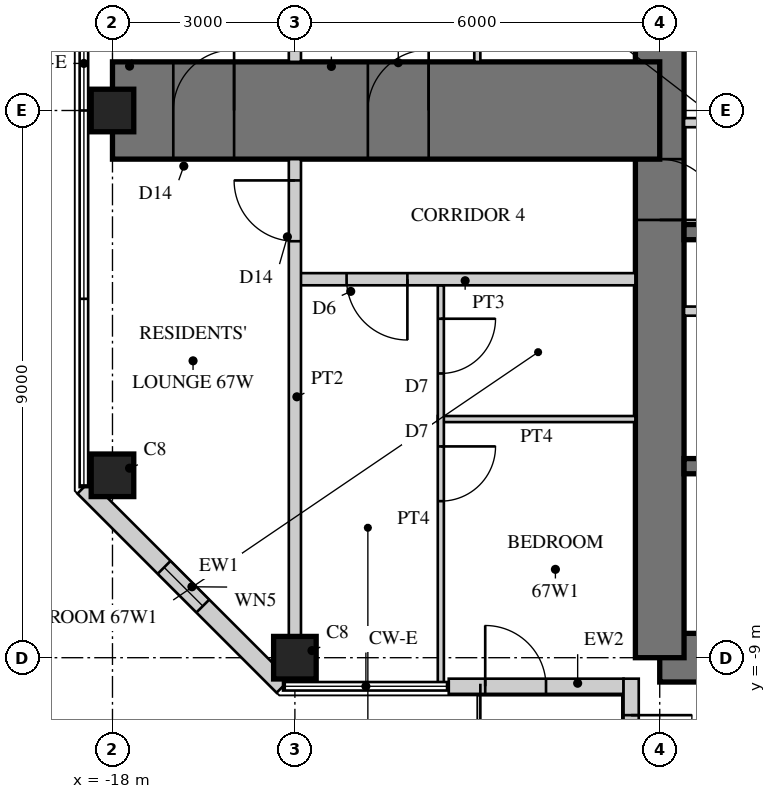
"""IFC4 building model, lengths in metres.
Left out: names, types, materials, properties, quantities, classifications, styles, units other than length and angle.
Written with IfcOpenShell. Run it as: python <this file> out.ifc"""

import sys

from ifc_helpers import new_model, si_unit, direction, frame, frame_2d, origin, origin_2d, place, context, subcontext, project, spatial, rectangle, hollow_rectangle, extrude, element, fill, save


model = new_model("IFC4")
c1 = context("Model", 3, precision=1e-05, world=origin(), true_north=direction((0.0, 1.0)))
c2 = subcontext(c1, "Body", "Model", "MODEL_VIEW")
j1 = project(units=[si_unit("LENGTHUNIT", "METRE"), si_unit("PLANEANGLEUNIT", "RADIAN")], contexts=[c1])
p1 = place(None, origin())
s1 = spatial("IfcSite", under=j1, at=p1, CompositionType="ELEMENT")
p2 = place(p1, origin())
s2 = spatial("IfcBuilding", under=s1, at=p2, CompositionType="ELEMENT")
p3 = place(p2, frame((0.0, 0.0, 261.1)))
s3 = spatial("IfcBuildingStorey", under=s2, at=p3, CompositionType="ELEMENT", Elevation=261.1)
p4 = place(p3, frame((-9.0, -9.0, 0.0), z_axis=(0.0, 0.0, 1.0), x_axis=(1.0, 0.0, 0.0)))
e1 = element("IfcWall", 1, at=p4, inside=s3, PredefinedType="SHEAR", context=c2, shape_type="SweptSolid", body=[
    extrude(rectangle(XDim=18.0, YDim=0.8, at=frame_2d((9.0, 0.0))), origin(), (0.0, 0.0, 1.0), 3.4),
])
p5 = place(p4, frame((9.8, 0.0, 0.0)))
e2 = element("IfcOpeningElement", 2, at=p5, cuts=e1, PredefinedType="OPENING", context=c2, shape_type="SweptSolid", body=[
    extrude(rectangle(XDim=1.0, YDim=2.4, at=frame_2d((0.5, 1.2))), frame((0.0, 0.41, 0.0), z_axis=(0.0, -1.0, 0.0), x_axis=(1.0, 0.0, 0.0)), (0.0, 0.0, 1.0), 0.82),
])
p6 = place(p3, frame((-9.0, 9.0, 0.0), z_axis=(0.0, 0.0, 1.0), x_axis=(0.0, -1.0, 0.0)))
e3 = element("IfcWall", 3, at=p6, inside=s3, PredefinedType="SHEAR", context=c2, shape_type="SweptSolid", body=[
    extrude(rectangle(XDim=18.0, YDim=0.8, at=frame_2d((9.0, 0.0))), origin(), (0.0, 0.0, 1.0), 3.4),
])
p7 = place(p6, frame((9.8, 0.0, 0.0)))
e4 = element("IfcOpeningElement", 4, at=p7, cuts=e3, PredefinedType="OPENING", context=c2, shape_type="SweptSolid", body=[
    extrude(rectangle(XDim=1.0, YDim=2.4, at=frame_2d((0.5, 1.2))), frame((0.0, 0.41, 0.0), z_axis=(0.0, -1.0, 0.0), x_axis=(1.0, 0.0, 0.0)), (0.0, 0.0, 1.0), 0.82),
])
p8 = place(p3, frame((-1.925, -2.0, 0.0), z_axis=(0.0, 0.0, 1.0), x_axis=(-1.0, 0.0, 0.0)))
e5 = element("IfcWall", 5, at=p8, inside=s3, PredefinedType="SHEAR", context=c2, shape_type="SweptSolid", body=[
    extrude(rectangle(XDim=6.675, YDim=0.25, at=frame_2d((3.337, 0.0))), origin(), (0.0, 0.0, 1.0), 3.4),
])
p9 = place(p3, frame((-1.925, -5.85, 0.0), z_axis=(0.0, 0.0, 1.0), x_axis=(-1.0, 0.0, 0.0)))
e6 = element("IfcWall", 6, at=p9, inside=s3, PredefinedType="SHEAR", context=c2, shape_type="SweptSolid", body=[
    extrude(rectangle(XDim=6.675, YDim=0.25, at=frame_2d((3.337, 0.0))), origin(), (0.0, 0.0, 1.0), 3.4),
])
p10 = place(p9, frame((0.496, 0.0, 0.0)))
e7 = element("IfcOpeningElement", 7, at=p10, cuts=e6, PredefinedType="OPENING", context=c2, shape_type="SweptSolid", body=[
    extrude(rectangle(XDim=1.1, YDim=2.2, at=frame_2d((0.55, 1.1))), frame((0.0, 0.135, 0.0), z_axis=(0.0, -1.0, 0.0), x_axis=(1.0, 0.0, 0.0)), (0.0, 0.0, 1.0), 0.27),
])
p11 = place(p9, frame((2.788, 0.0, 0.0)))
e8 = element("IfcOpeningElement", 8, at=p11, cuts=e6, PredefinedType="OPENING", context=c2, shape_type="SweptSolid", body=[
    extrude(rectangle(XDim=1.1, YDim=2.2, at=frame_2d((0.55, 1.1))), frame((0.0, 0.135, 0.0), z_axis=(0.0, -1.0, 0.0), x_axis=(1.0, 0.0, 0.0)), (0.0, 0.0, 1.0), 0.27),
])
p12 = place(p9, frame((5.079, 0.0, 0.0)))
e9 = element("IfcOpeningElement", 9, at=p12, cuts=e6, PredefinedType="OPENING", context=c2, shape_type="SweptSolid", body=[
    extrude(rectangle(XDim=1.1, YDim=2.2, at=frame_2d((0.55, 1.1))), frame((0.0, 0.135, 0.0), z_axis=(0.0, -1.0, 0.0), x_axis=(1.0, 0.0, 0.0)), (0.0, 0.0, 1.0), 0.27),
])
p13 = place(p3, frame((-1.925, -3.3, 0.0), z_axis=(0.0, 0.0, 1.0), x_axis=(-1.0, 0.0, 0.0)))
e10 = element("IfcWall", 10, at=p13, inside=s3, PredefinedType="PARTITIONING", context=c2, shape_type="SweptSolid", body=[
    extrude(rectangle(XDim=6.675, YDim=0.15, at=frame_2d((3.337, 0.0))), origin(), (0.0, 0.0, 1.0), 3.4),
])
p14 = place(p13, frame((0.075, 0.0, 0.0)))
e11 = element("IfcOpeningElement", 11, at=p14, cuts=e10, PredefinedType="OPENING", context=c2, shape_type="SweptSolid", body=[
    extrude(rectangle(XDim=0.8, YDim=2.1, at=frame_2d((0.4, 1.05))), frame((0.0, 0.085, 0.0), z_axis=(0.0, -1.0, 0.0), x_axis=(1.0, 0.0, 0.0)), (0.0, 0.0, 1.0), 0.17),
])
p15 = place(p13, frame((3.675, 0.0, 0.0)))
e12 = element("IfcOpeningElement", 12, at=p15, cuts=e10, PredefinedType="OPENING", context=c2, shape_type="SweptSolid", body=[
    extrude(rectangle(XDim=0.8, YDim=2.1, at=frame_2d((0.4, 1.05))), frame((0.0, 0.085, 0.0), z_axis=(0.0, -1.0, 0.0), x_axis=(1.0, 0.0, 0.0)), (0.0, 0.0, 1.0), 0.17),
])
p16 = place(p3, frame((-9.0, 0.0, 0.0), z_axis=(0.0, 0.0, 1.0), x_axis=(-1.0, 0.0, 0.0)))
e13 = element("IfcWall", 13, at=p16, inside=s3, PredefinedType="SHEAR", context=c2, shape_type="SweptSolid", body=[
    extrude(rectangle(XDim=9.0, YDim=1.6, at=frame_2d((4.5, 0.0))), origin(), (0.0, 0.0, 1.0), 3.4),
])
p17 = place(p16, frame((3.8, 0.0, 0.0)))
e14 = element("IfcOpeningElement", 14, at=p17, cuts=e13, PredefinedType="OPENING", context=c2, shape_type="SweptSolid", body=[
    extrude(rectangle(XDim=1.0, YDim=2.15, at=frame_2d((0.5, 1.075))), frame((0.0, 0.81, 0.0), z_axis=(0.0, -1.0, 0.0), x_axis=(1.0, 0.0, 0.0)), (0.0, 0.0, 1.0), 1.62),
])
p18 = place(p16, frame((7.0, 0.0, 0.0)))
e15 = element("IfcOpeningElement", 15, at=p18, cuts=e13, PredefinedType="OPENING", context=c2, shape_type="SweptSolid", body=[
    extrude(rectangle(XDim=1.0, YDim=2.2, at=frame_2d((0.5, 1.1))), frame((0.0, 0.81, 0.0), z_axis=(0.0, -1.0, 0.0), x_axis=(1.0, 0.0, 0.0)), (0.0, 0.0, 1.0), 1.62),
])
for number, where, z_axis, x_axis in (
    (16, (-15.0, -9.0, 0.0), (0.0, 0.0, 1.0), (1.0, 0.0, 0.0)),
    (17, (-18.0, 0.0, 0.0), (0.0, 0.0, 1.0), (1.0, 0.0, 0.0)),
    (18, (-18.0, -6.0, 0.0), (0.0, 0.0, 1.0), (1.0, 0.0, 0.0)),
):
    element("IfcColumn", number, at=place(p3, frame(where, z_axis=z_axis, x_axis=x_axis)), inside=s3, PredefinedType="COLUMN", context=c2, shape_type="SweptSolid", body=[
        extrude(rectangle(XDim=0.7, YDim=0.7, at=origin_2d()), origin(), (0.0, 0.0, 1.0), 3.4),
    ])
p19 = place(p3, frame((-18.47, -6.195, 0.0), z_axis=(0.0, 0.0, 1.0), x_axis=(0.707106781187, -0.707106781187, 0.0)))
e19 = element("IfcWall", 19, at=p19, inside=s3, PredefinedType="SOLIDWALL", context=c2, shape_type="SweptSolid", body=[
    extrude(rectangle(XDim=4.632, YDim=0.3, at=frame_2d((2.316, 0.0))), origin(), (0.0, 0.0, 1.0), 3.22),
])
p20 = place(p19, frame((1.866, 0.0, 0.3)))
e20 = element("IfcOpeningElement", 20, at=p20, cuts=e19, PredefinedType="OPENING", context=c2, shape_type="SweptSolid", body=[
    extrude(rectangle(XDim=0.9, YDim=2.4, at=frame_2d((0.45, 1.2))), frame((0.0, 0.16, 0.0), z_axis=(0.0, -1.0, 0.0), x_axis=(1.0, 0.0, 0.0)), (0.0, 0.0, 1.0), 0.32),
])
p21 = place(p3, frame((-12.47, -9.47, 0.0), z_axis=(0.0, 0.0, 1.0), x_axis=(1.0, 0.0, 0.0)))
e21 = element("IfcWall", 21, at=p21, inside=s3, PredefinedType="SOLIDWALL", context=c2, shape_type="SweptSolid", body=[
    extrude(rectangle(XDim=2.875, YDim=0.25, at=frame_2d((1.438, 0.0))), origin(), (0.0, 0.0, 1.0), 3.22),
])
p22 = place(p21, frame((0.6, 0.0, 0.0)))
e22 = element("IfcOpeningElement", 22, at=p22, cuts=e21, PredefinedType="OPENING", context=c2, shape_type="SweptSolid", body=[
    extrude(rectangle(XDim=1.0, YDim=2.2, at=frame_2d((0.5, 1.1))), frame((0.0, 0.135, 0.0), z_axis=(0.0, -1.0, 0.0), x_axis=(1.0, 0.0, 0.0)), (0.0, 0.0, 1.0), 0.27),
])
p23 = place(p3, frame((-9.47, -9.345, 0.0), z_axis=(0.0, 0.0, 1.0), x_axis=(0.0, -1.0, 0.0)))
e23 = element("IfcWall", 23, at=p23, inside=s3, PredefinedType="SOLIDWALL", context=c2, shape_type="SweptSolid", body=[
    extrude(rectangle(XDim=3.125, YDim=0.25, at=frame_2d((1.562, 0.0))), origin(), (0.0, 0.0, 1.0), 3.22),
])
p24 = place(p23, frame((0.6, 0.0, 0.0)))
e24 = element("IfcOpeningElement", 24, at=p24, cuts=e23, PredefinedType="OPENING", context=c2, shape_type="SweptSolid", body=[
    extrude(rectangle(XDim=1.0, YDim=2.2, at=frame_2d((0.5, 1.1))), frame((0.0, 0.135, 0.0), z_axis=(0.0, -1.0, 0.0), x_axis=(1.0, 0.0, 0.0)), (0.0, 0.0, 1.0), 0.27),
])
p25 = place(p3, frame((-2.325, -0.2, 0.0), z_axis=(0.0, 0.0, 1.0), x_axis=(-1.0, 0.0, 0.0)))
e25 = element("IfcWall", 25, at=p25, inside=s3, PredefinedType="PARTITIONING", context=c2, shape_type="SweptSolid", body=[
    extrude(rectangle(XDim=6.275, YDim=0.15, at=frame_2d((3.138, 0.0))), origin(), (0.0, 0.0, 1.0), 3.22),
])
p26 = place(p25, frame((0.4, 0.0, 0.0)))
e26 = element("IfcOpeningElement", 26, at=p26, cuts=e25, PredefinedType="OPENING", context=c2, shape_type="SweptSolid", body=[
    extrude(rectangle(XDim=1.0, YDim=2.1, at=frame_2d((0.5, 1.05))), frame((0.0, 0.085, 0.0), z_axis=(0.0, -1.0, 0.0), x_axis=(1.0, 0.0, 0.0)), (0.0, 0.0, 1.0), 0.17),
])
p27 = place(p3, frame((-9.4, -5.075, 0.0), z_axis=(0.0, 0.0, 1.0), x_axis=(-1.0, 0.0, 0.0)))
e27 = element("IfcWall", 27, at=p27, inside=s3, PredefinedType="PARTITIONING", context=c2, shape_type="SweptSolid", body=[
    extrude(rectangle(XDim=3.25, YDim=0.1, at=frame_2d((1.625, 0.0))), origin(), (0.0, 0.0, 1.0), 3.22),
])
p28 = place(p3, frame((-12.6, -2.875, 0.0), z_axis=(0.0, 0.0, 1.0), x_axis=(0.0, -1.0, 0.0)))
e28 = element("IfcWall", 28, at=p28, inside=s3, PredefinedType="PARTITIONING", context=c2, shape_type="SweptSolid", body=[
    extrude(rectangle(XDim=6.555, YDim=0.1, at=frame_2d((3.277, 0.0))), origin(), (0.0, 0.0, 1.0), 3.22),
])
p29 = place(p28, frame((0.55, 0.0, 0.0)))
e29 = element("IfcOpeningElement", 29, at=p29, cuts=e28, PredefinedType="OPENING", context=c2, shape_type="SweptSolid", body=[
    extrude(rectangle(XDim=0.9, YDim=2.1, at=frame_2d((0.45, 1.05))), frame((0.0, 0.06, 0.0), z_axis=(0.0, -1.0, 0.0), x_axis=(1.0, 0.0, 0.0)), (0.0, 0.0, 1.0), 0.12),
])
p30 = place(p28, frame((2.65, 0.0, 0.0)))
e30 = element("IfcOpeningElement", 30, at=p30, cuts=e28, PredefinedType="OPENING", context=c2, shape_type="SweptSolid", body=[
    extrude(rectangle(XDim=0.9, YDim=2.1, at=frame_2d((0.45, 1.05))), frame((0.0, 0.06, 0.0), z_axis=(0.0, -1.0, 0.0), x_axis=(1.0, 0.0, 0.0)), (0.0, 0.0, 1.0), 0.12),
])
p31 = place(p3, frame((-12.0, 9.345, 0.0), z_axis=(0.0, 0.0, 1.0), x_axis=(0.0, -1.0, 0.0)))
e31 = element("IfcWall", 31, at=p31, inside=s3, PredefinedType="PARTITIONING", context=c2, shape_type="SweptSolid", body=[
    extrude(rectangle(XDim=8.545, YDim=0.1, at=frame_2d((4.272, 0.0))), origin(), (0.0, 0.0, 1.0), 3.22),
])
p32 = place(p31, frame((4.995, 0.0, 0.0)))
e32 = element("IfcOpeningElement", 32, at=p32, cuts=e31, PredefinedType="OPENING", context=c2, shape_type="SweptSolid", body=[
    extrude(rectangle(XDim=0.9, YDim=2.1, at=frame_2d((0.45, 1.05))), frame((0.0, 0.06, 0.0), z_axis=(0.0, -1.0, 0.0), x_axis=(1.0, 0.0, 0.0)), (0.0, 0.0, 1.0), 0.12),
])
p33 = place(p31, frame((7.095, 0.0, 0.0)))
e33 = element("IfcOpeningElement", 33, at=p33, cuts=e31, PredefinedType="OPENING", context=c2, shape_type="SweptSolid", body=[
    extrude(rectangle(XDim=0.9, YDim=2.1, at=frame_2d((0.45, 1.05))), frame((0.0, 0.06, 0.0), z_axis=(0.0, -1.0, 0.0), x_axis=(1.0, 0.0, 0.0)), (0.0, 0.0, 1.0), 0.12),
])
p34 = place(p3, frame((-9.4, -2.775, 0.0), z_axis=(0.0, 0.0, 1.0), x_axis=(-1.0, 0.0, 0.0)))
e34 = element("IfcWall", 34, at=p34, inside=s3, PredefinedType="SOLIDWALL", context=c2, shape_type="SweptSolid", body=[
    extrude(rectangle(XDim=5.6, YDim=0.2, at=frame_2d((2.8, 0.0))), origin(), (0.0, 0.0, 1.0), 3.22),
])
p35 = place(p34, frame((3.75, 0.0, 0.0)))
e35 = element("IfcOpeningElement", 35, at=p35, cuts=e34, PredefinedType="OPENING", context=c2, shape_type="SweptSolid", body=[
    extrude(rectangle(XDim=1.0, YDim=2.15, at=frame_2d((0.5, 1.075))), frame((0.0, 0.11, 0.0), z_axis=(0.0, -1.0, 0.0), x_axis=(1.0, 0.0, 0.0)), (0.0, 0.0, 1.0), 0.22),
])
p36 = place(p3, frame((-15.0, 8.65, 0.0), z_axis=(0.0, 0.0, 1.0), x_axis=(0.0, -1.0, 0.0)))
e36 = element("IfcWall", 36, at=p36, inside=s3, PredefinedType="SOLIDWALL", context=c2, shape_type="SweptSolid", body=[
    extrude(rectangle(XDim=7.85, YDim=0.2, at=frame_2d((3.925, 0.0))), origin(), (0.0, 0.0, 1.0), 2.52),
])
p37 = place(p3, frame((-15.0, -0.8, 0.0), z_axis=(0.0, 0.0, 1.0), x_axis=(0.0, -1.0, 0.0)))
e37 = element("IfcWall", 37, at=p37, inside=s3, PredefinedType="SOLIDWALL", context=c2, shape_type="SweptSolid", body=[
    extrude(rectangle(XDim=7.85, YDim=0.2, at=frame_2d((3.925, 0.0))), origin(), (0.0, 0.0, 1.0), 2.52),
])
p38 = place(p37, frame((0.35, 0.0, 0.0)))
e38 = element("IfcOpeningElement", 38, at=p38, cuts=e37, PredefinedType="OPENING", context=c2, shape_type="SweptSolid", body=[
    extrude(rectangle(XDim=1.0, YDim=2.2, at=frame_2d((0.5, 1.1))), frame((0.0, 0.11, 0.0), z_axis=(0.0, -1.0, 0.0), x_axis=(1.0, 0.0, 0.0)), (0.0, 0.0, 1.0), 0.22),
])
p39 = place(p20, origin())
e39 = element("IfcWindow", 39, at=p39, inside=s3, PartitioningType="SINGLE_PANEL", PredefinedType="WINDOW", context=c2, shape_type="SweptSolid", body=[
    extrude(hollow_rectangle(XDim=0.9, YDim=2.4, WallThickness=0.06, at=frame_2d((0.45, 1.2))), frame((0.0, 0.03, 0.0), z_axis=(0.0, -1.0, 0.0), x_axis=(1.0, 0.0, 0.0)), (0.0, 0.0, 1.0), 0.06),
    extrude(rectangle(XDim=0.779, YDim=2.279, at=frame_2d((0.45, 1.2))), frame((0.0, 0.03, 0.0), z_axis=(0.0, -1.0, 0.0), x_axis=(1.0, 0.0, 0.0)), (0.0, 0.0, 1.0), 0.06),
])
fill(e20, e39)
p40 = place(p22, origin())
e40 = element("IfcDoor", 40, at=p40, inside=s3, OperationType="SINGLE_SWING_LEFT", PredefinedType="DOOR", context=c2, shape_type="SweptSolid", body=[
    extrude(hollow_rectangle(XDim=1.0, YDim=2.2, WallThickness=0.06, at=frame_2d((0.5, 1.1))), frame((0.0, 0.025, 0.0), z_axis=(0.0, -1.0, 0.0), x_axis=(1.0, 0.0, 0.0)), (0.0, 0.0, 1.0), 0.05),
    extrude(rectangle(XDim=0.879, YDim=2.079, at=frame_2d((0.5, 1.1))), frame((0.0, 0.025, 0.0), z_axis=(0.0, -1.0, 0.0), x_axis=(1.0, 0.0, 0.0)), (0.0, 0.0, 1.0), 0.05),
])
fill(e22, e40)
p41 = place(p24, origin())
e41 = element("IfcDoor", 41, at=p41, inside=s3, OperationType="SINGLE_SWING_LEFT", PredefinedType="DOOR", context=c2, shape_type="SweptSolid", body=[
    extrude(hollow_rectangle(XDim=1.0, YDim=2.2, WallThickness=0.06, at=frame_2d((0.5, 1.1))), frame((0.0, 0.025, 0.0), z_axis=(0.0, -1.0, 0.0), x_axis=(1.0, 0.0, 0.0)), (0.0, 0.0, 1.0), 0.05),
    extrude(rectangle(XDim=0.879, YDim=2.079, at=frame_2d((0.5, 1.1))), frame((0.0, 0.025, 0.0), z_axis=(0.0, -1.0, 0.0), x_axis=(1.0, 0.0, 0.0)), (0.0, 0.0, 1.0), 0.05),
])
fill(e24, e41)
p42 = place(p29, origin())
e42 = element("IfcDoor", 42, at=p42, inside=s3, OperationType="SINGLE_SWING_LEFT", PredefinedType="DOOR", context=c2, shape_type="SweptSolid", body=[
    extrude(rectangle(XDim=0.9, YDim=2.1, at=frame_2d((0.45, 1.05))), frame((0.0, 0.025, 0.0), z_axis=(0.0, -1.0, 0.0), x_axis=(1.0, 0.0, 0.0)), (0.0, 0.0, 1.0), 0.05),
])
fill(e29, e42)
p43 = place(p30, origin())
e43 = element("IfcDoor", 43, at=p43, inside=s3, OperationType="SINGLE_SWING_LEFT", PredefinedType="DOOR", context=c2, shape_type="SweptSolid", body=[
    extrude(rectangle(XDim=0.9, YDim=2.1, at=frame_2d((0.45, 1.05))), frame((0.0, 0.025, 0.0), z_axis=(0.0, -1.0, 0.0), x_axis=(1.0, 0.0, 0.0)), (0.0, 0.0, 1.0), 0.05),
])
fill(e30, e43)
p44 = place(p35, origin())
e44 = element("IfcDoor", 44, at=p44, inside=s3, OperationType="SINGLE_SWING_LEFT", PredefinedType="DOOR", context=c2, shape_type="SweptSolid", body=[
    extrude(rectangle(XDim=1.0, YDim=2.15, at=frame_2d((0.5, 1.075))), frame((0.0, 0.025, 0.0), z_axis=(0.0, -1.0, 0.0), x_axis=(1.0, 0.0, 0.0)), (0.0, 0.0, 1.0), 0.05),
])
fill(e35, e44)
p45 = place(p38, frame((1.0, 0.0, 0.0), z_axis=(0.0, 0.0, 1.0), x_axis=(-1.0, 0.0, 0.0)))
e45 = element("IfcDoor", 45, at=p45, inside=s3, OperationType="SINGLE_SWING_RIGHT", PredefinedType="DOOR", context=c2, shape_type="SweptSolid", body=[
    extrude(rectangle(XDim=1.0, YDim=2.2, at=frame_2d((0.5, 1.1))), frame((0.0, 0.025, 0.0), z_axis=(0.0, -1.0, 0.0), x_axis=(1.0, 0.0, 0.0)), (0.0, 0.0, 1.0), 0.05),
])
fill(e38, e45)
p46 = place(p17, frame((1.0, 0.0, 0.0), z_axis=(0.0, 0.0, 1.0), x_axis=(-1.0, 0.0, 0.0)))
e46 = element("IfcDoor", 46, at=p46, inside=s3, OperationType="SINGLE_SWING_RIGHT", PredefinedType="DOOR", context=c2, shape_type="SweptSolid", body=[
    extrude(rectangle(XDim=1.0, YDim=2.15, at=frame_2d((0.5, 1.075))), frame((0.0, 0.025, 0.0), z_axis=(0.0, -1.0, 0.0), x_axis=(1.0, 0.0, 0.0)), (0.0, 0.0, 1.0), 0.05),
])
fill(e14, e46)
p47 = place(p18, frame((1.0, 0.0, 0.0), z_axis=(0.0, 0.0, 1.0), x_axis=(-1.0, 0.0, 0.0)))
e47 = element("IfcDoor", 47, at=p47, inside=s3, OperationType="SINGLE_SWING_RIGHT", PredefinedType="DOOR", context=c2, shape_type="SweptSolid", body=[
    extrude(rectangle(XDim=1.0, YDim=2.2, at=frame_2d((0.5, 1.1))), frame((0.0, 0.025, 0.0), z_axis=(0.0, -1.0, 0.0), x_axis=(1.0, 0.0, 0.0)), (0.0, 0.0, 1.0), 0.05),
])
fill(e15, e47)
p48 = place(p7, origin())
e48 = element("IfcDoor", 48, at=p48, inside=s3, OperationType="SINGLE_SWING_RIGHT", PredefinedType="DOOR", context=c2, shape_type="SweptSolid", body=[
    extrude(rectangle(XDim=1.0, YDim=2.4, at=frame_2d((0.5, 1.2))), frame((0.0, 0.055, 0.0), z_axis=(0.0, -1.0, 0.0), x_axis=(1.0, 0.0, 0.0)), (0.0, 0.0, 1.0), 0.05),
])
fill(e4, e48)
save(model, sys.argv[1])
